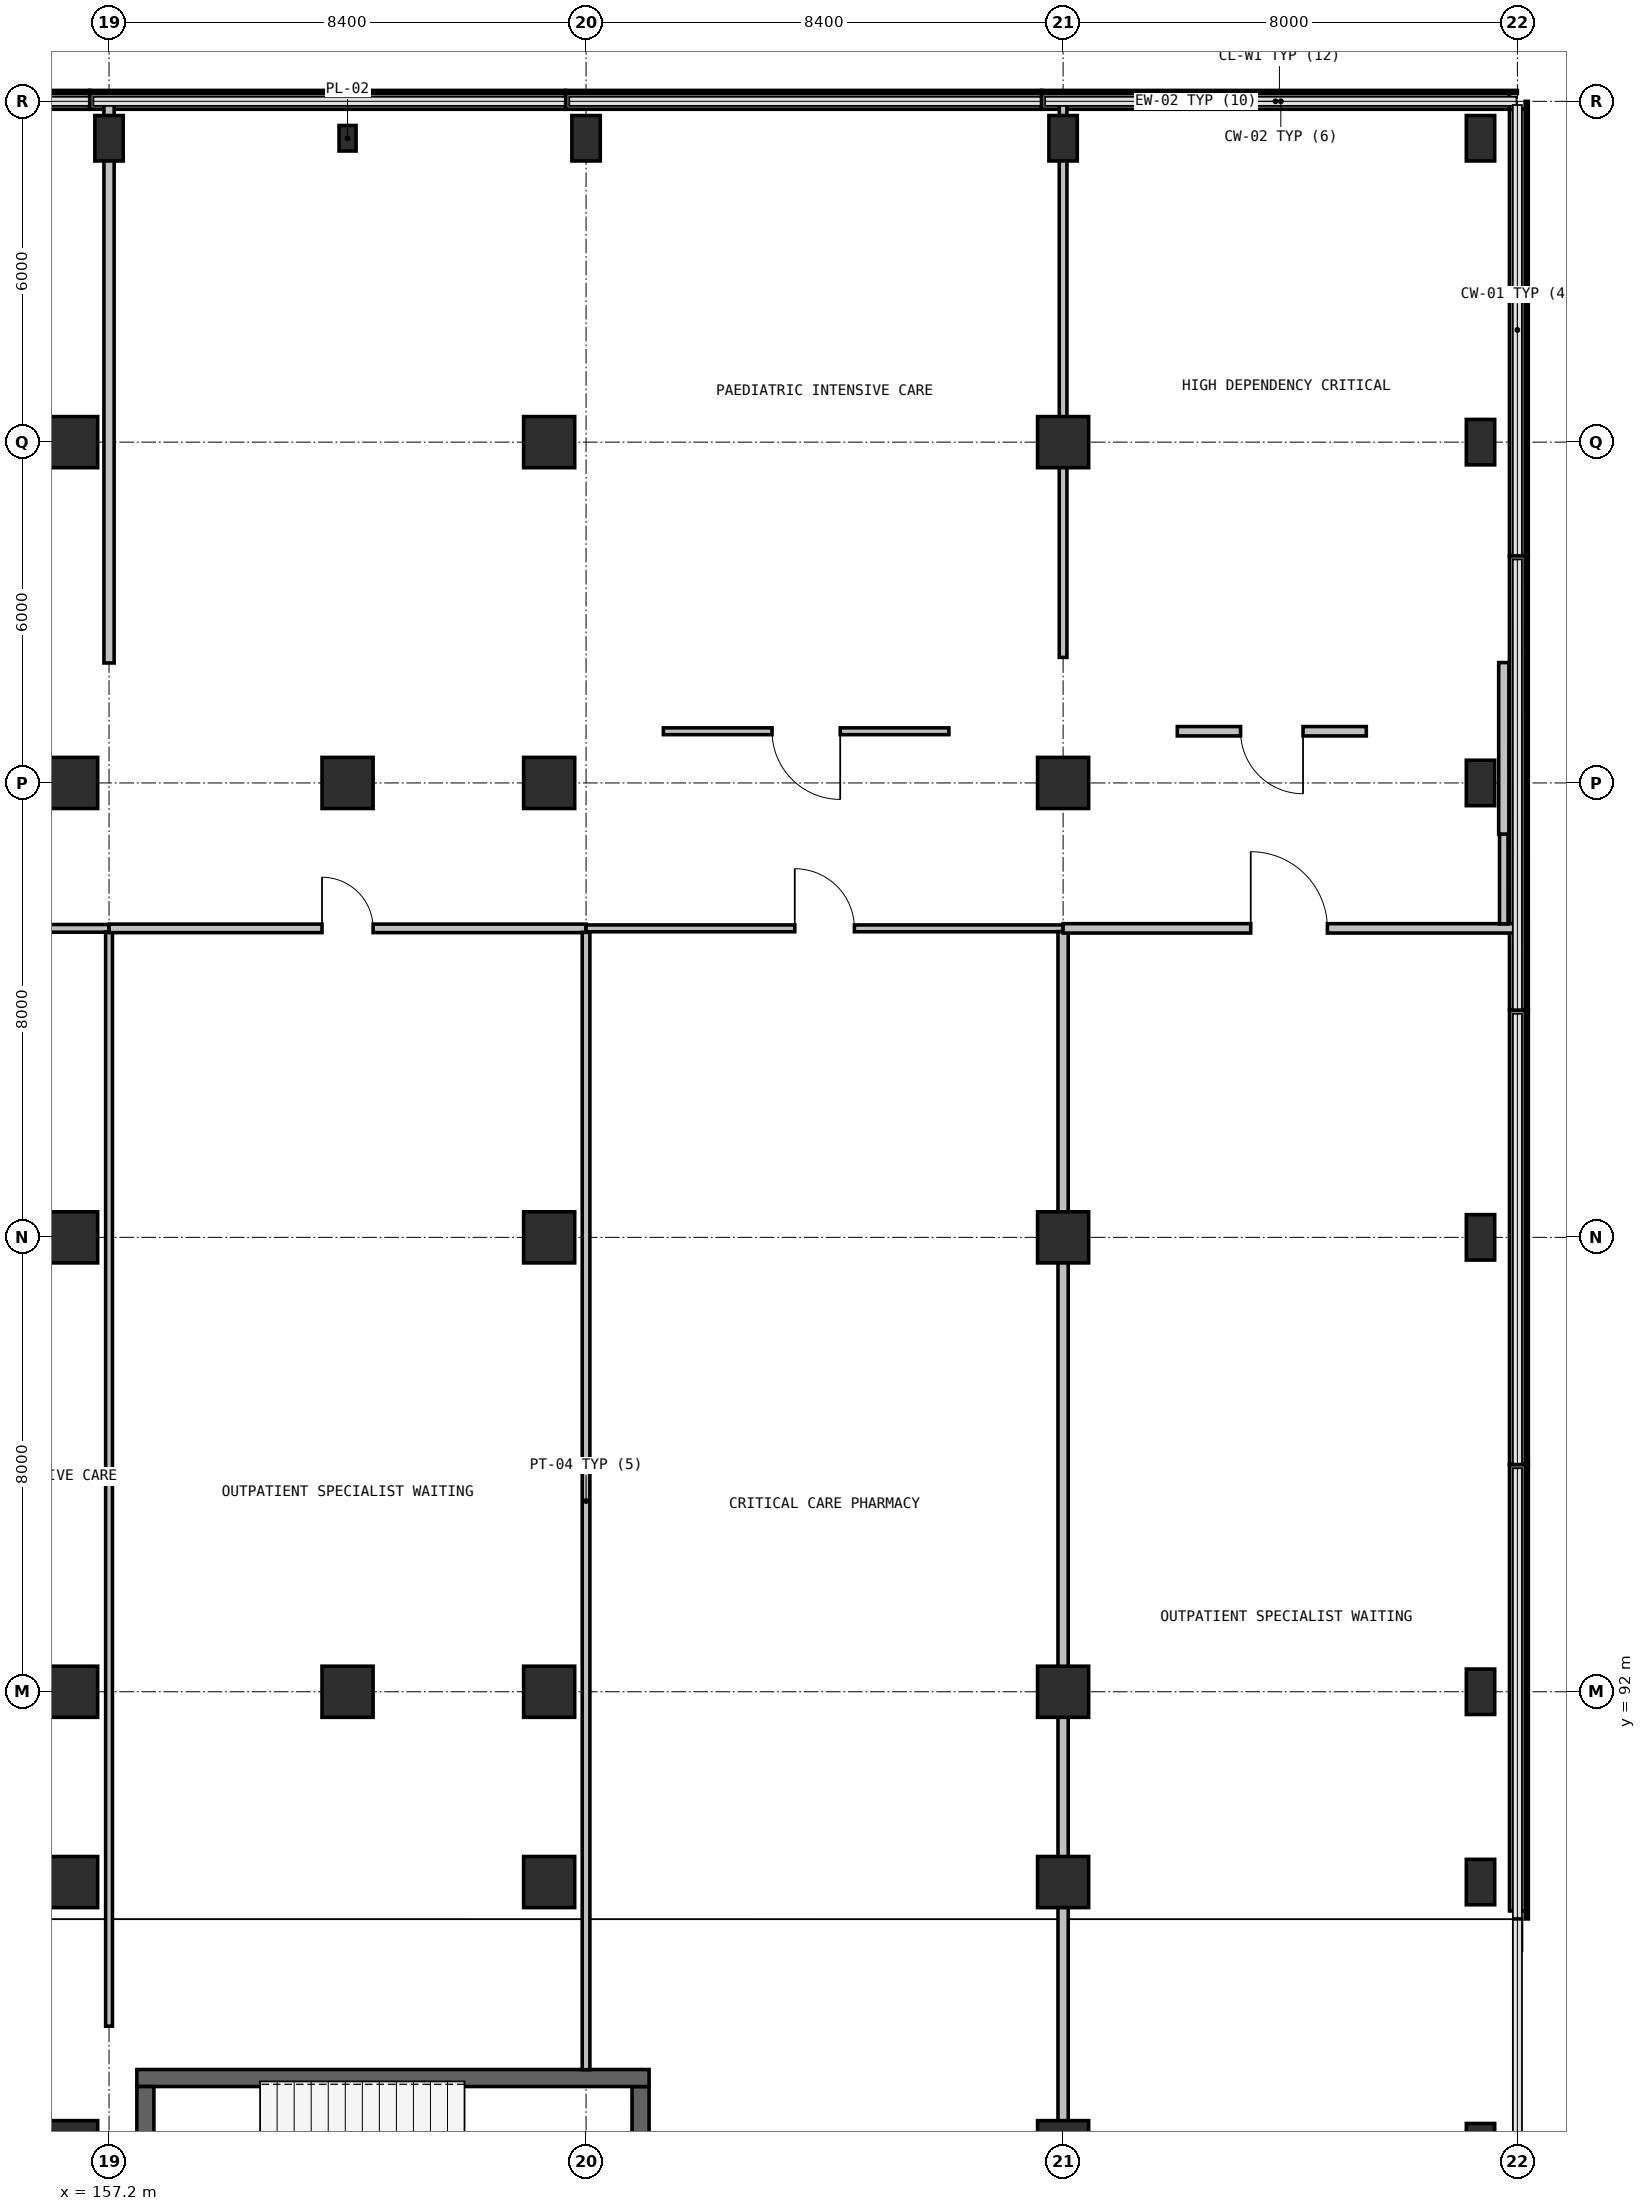
"""IFC4 building model, lengths in metres.
Left out: names, types, materials, properties, quantities, classifications, styles, units other than length and angle.
Written with IfcOpenShell. Run it as: python <this file> out.ifc"""

import sys

from ifc_helpers import new_model, si_unit, direction, frame, frame_2d, origin, origin_2d, place, context, subcontext, project, spatial, rectangle, extrude, element, fill, save


model = new_model("IFC4")
c1 = context("Model", 3, precision=1e-05, world=origin(), true_north=direction((0.0, 1.0)))
c2 = subcontext(c1, "Body", "Model", "MODEL_VIEW")
j1 = project(units=[si_unit("LENGTHUNIT", "METRE"), si_unit("PLANEANGLEUNIT", "RADIAN")], contexts=[c1])
p1 = place(None, origin())
s1 = spatial("IfcSite", under=j1, at=p1, CompositionType="ELEMENT")
p2 = place(p1, origin())
s2 = spatial("IfcBuilding", under=s1, at=p2, CompositionType="ELEMENT")
p3 = place(p2, frame((0.0, 0.0, 5.4)))
s3 = spatial("IfcBuildingStorey", under=s2, at=p3, CompositionType="ELEMENT", Elevation=5.4)
for number, where, z_axis, x_axis in (
    (1, (161.4, 92.0, 0.0), (0.0, 0.0, 1.0), (1.0, 0.0, 0.0)),
    (2, (161.4, 108.0, 0.0), (0.0, 0.0, 1.0), (1.0, 0.0, 0.0)),
):
    element("IfcColumn", number, at=place(p3, frame(where, z_axis=z_axis, x_axis=x_axis)), inside=s3, PredefinedType="COLUMN", context=c2, shape_type="SweptSolid", body=[
        extrude(rectangle(XDim=0.9, YDim=0.9, at=origin_2d()), origin(), (0.0, 0.0, 1.0), 4.8),
    ])
for number, where, z_axis, x_axis in (
    (3, (157.2, 119.35, 0.0), (0.0, 0.0, 1.0), (1.0, 0.0, 0.0)),
    (4, (165.6, 119.35, 0.0), (0.0, 0.0, 1.0), (1.0, 0.0, 0.0)),
    (5, (174.0, 119.35, 0.0), (0.0, 0.0, 1.0), (1.0, 0.0, 0.0)),
    (6, (181.35, 119.35, 0.0), (0.0, 0.0, 1.0), (1.0, 0.0, 0.0)),
):
    element("IfcColumn", number, at=place(p3, frame(where, z_axis=z_axis, x_axis=x_axis)), inside=s3, PredefinedType="COLUMN", context=c2, shape_type="SweptSolid", body=[
        extrude(rectangle(XDim=0.5, YDim=0.8, at=origin_2d()), origin(), (0.0, 0.0, 1.0), 4.8),
    ])
for number, where, z_axis, x_axis in (
    (7, (156.55, 84.0, 0.0), (0.0, 0.0, 1.0), (1.0, 0.0, 0.0)),
    (8, (156.55, 88.65, 0.0), (0.0, 0.0, 1.0), (1.0, 0.0, 0.0)),
    (9, (156.55, 92.0, 0.0), (0.0, 0.0, 1.0), (1.0, 0.0, 0.0)),
    (10, (156.55, 100.0, 0.0), (0.0, 0.0, 1.0), (1.0, 0.0, 0.0)),
    (11, (156.55, 108.0, 0.0), (0.0, 0.0, 1.0), (1.0, 0.0, 0.0)),
    (12, (156.55, 114.0, 0.0), (0.0, 0.0, 1.0), (1.0, 0.0, 0.0)),
    (13, (164.95, 88.65, 0.0), (0.0, 0.0, 1.0), (1.0, 0.0, 0.0)),
    (14, (164.95, 92.0, 0.0), (0.0, 0.0, 1.0), (1.0, 0.0, 0.0)),
    (15, (164.95, 100.0, 0.0), (0.0, 0.0, 1.0), (1.0, 0.0, 0.0)),
    (16, (164.95, 108.0, 0.0), (0.0, 0.0, 1.0), (1.0, 0.0, 0.0)),
    (17, (164.95, 114.0, 0.0), (0.0, 0.0, 1.0), (1.0, 0.0, 0.0)),
    (18, (174.0, 84.0, 0.0), (0.0, 0.0, 1.0), (1.0, 0.0, 0.0)),
    (19, (174.0, 88.65, 0.0), (0.0, 0.0, 1.0), (1.0, 0.0, 0.0)),
    (20, (174.0, 92.0, 0.0), (0.0, 0.0, 1.0), (1.0, 0.0, 0.0)),
    (21, (174.0, 100.0, 0.0), (0.0, 0.0, 1.0), (1.0, 0.0, 0.0)),
    (22, (174.0, 108.0, 0.0), (0.0, 0.0, 1.0), (1.0, 0.0, 0.0)),
    (23, (174.0, 114.0, 0.0), (0.0, 0.0, 1.0), (1.0, 0.0, 0.0)),
):
    element("IfcColumn", number, at=place(p3, frame(where, z_axis=z_axis, x_axis=x_axis)), inside=s3, PredefinedType="COLUMN", context=c2, shape_type="SweptSolid", body=[
        extrude(rectangle(XDim=0.9, YDim=0.9, at=origin_2d()), origin(), (0.0, 0.0, 1.0), 4.8),
    ])
for number, where, z_axis, x_axis in (
    (24, (181.35, 84.0, 0.0), (0.0, 0.0, 1.0), (1.0, 0.0, 0.0)),
    (25, (181.35, 88.65, 0.0), (0.0, 0.0, 1.0), (1.0, 0.0, 0.0)),
    (26, (181.35, 92.0, 0.0), (0.0, 0.0, 1.0), (1.0, 0.0, 0.0)),
    (27, (181.35, 100.0, 0.0), (0.0, 0.0, 1.0), (1.0, 0.0, 0.0)),
    (28, (181.35, 108.0, 0.0), (0.0, 0.0, 1.0), (1.0, 0.0, 0.0)),
    (29, (181.35, 114.0, 0.0), (0.0, 0.0, 1.0), (1.0, 0.0, 0.0)),
):
    element("IfcColumn", number, at=place(p3, frame(where, z_axis=z_axis, x_axis=x_axis)), inside=s3, PredefinedType="COLUMN", context=c2, shape_type="SweptSolid", body=[
        extrude(rectangle(XDim=0.5, YDim=0.8, at=origin_2d()), origin(), (0.0, 0.0, 1.0), 4.8),
    ])
p4 = place(p3, frame((161.4, 119.35, 0.0), z_axis=(0.0, 0.0, 1.0), x_axis=(1.0, 0.0, 0.0)))
e30 = element("IfcColumn", 30, at=p4, inside=s3, PredefinedType="PILASTER", context=c2, shape_type="SweptSolid", body=[
    extrude(rectangle(XDim=0.3, YDim=0.45, at=origin_2d()), origin(), (0.0, 0.0, 1.0), 4.445),
])
for number, where, z_axis, x_axis in (
    (31, (148.481, 120.0, 0.0), (0.0, 0.0, 1.0), (1.0, 0.0, 0.0)),
    (32, (156.861, 120.0, 0.0), (0.0, 0.0, 1.0), (1.0, 0.0, 0.0)),
    (33, (165.241, 120.0, 0.0), (0.0, 0.0, 1.0), (1.0, 0.0, 0.0)),
):
    element("IfcWall", number, at=place(p3, frame(where, z_axis=z_axis, x_axis=x_axis)), inside=s3, PredefinedType="SOLIDWALL", context=c2, shape_type="SweptSolid", body=[
        extrude(rectangle(XDim=8.376, YDim=0.28, at=frame_2d((4.188, 0.0))), origin(), (0.0, 0.0, 1.0), 0.94),
    ])
p5 = place(p3, frame((173.621, 120.0, 0.0), z_axis=(0.0, 0.0, 1.0), x_axis=(1.0, 0.0, 0.0)))
e34 = element("IfcWall", 34, at=p5, inside=s3, PredefinedType="SOLIDWALL", context=c2, shape_type="SweptSolid", body=[
    extrude(rectangle(XDim=8.238, YDim=0.28, at=frame_2d((4.119, 0.0))), origin(), (0.0, 0.0, 1.0), 0.94),
])
p6 = place(p3, frame((181.999, 119.86, 0.0), z_axis=(0.0, 0.0, 1.0), x_axis=(0.0, -1.0, 0.0)))
e35 = element("IfcWall", 35, at=p6, inside=s3, PredefinedType="SOLIDWALL", context=c2, shape_type="SweptSolid", body=[
    extrude(rectangle(XDim=7.858, YDim=0.28, at=frame_2d((3.929, 0.0))), origin(), (0.0, 0.0, 1.0), 0.94),
])
p7 = place(p3, frame((181.999, 111.998, 0.0), z_axis=(0.0, 0.0, 1.0), x_axis=(0.000122144863, -0.99999999254, 0.0)))
e36 = element("IfcWall", 36, at=p7, inside=s3, PredefinedType="SOLIDWALL", context=c2, shape_type="SweptSolid", body=[
    extrude(rectangle(XDim=7.995, YDim=0.28, at=frame_2d((3.998, 0.0))), origin(), (0.0, 0.0, 1.0), 0.94),
])
p8 = place(p3, frame((182.0, 103.999, 0.0), z_axis=(0.0, 0.0, 1.0), x_axis=(0.0, -1.0, 0.0)))
e37 = element("IfcWall", 37, at=p8, inside=s3, PredefinedType="SOLIDWALL", context=c2, shape_type="SweptSolid", body=[
    extrude(rectangle(XDim=7.996, YDim=0.28, at=frame_2d((3.998, 0.0))), origin(), (0.0, 0.0, 1.0), 0.94),
])
p9 = place(p3, frame((182.0, 95.999, 0.0), z_axis=(0.0, 0.0, 1.0), x_axis=(0.0, -1.0, 0.0)))
e38 = element("IfcWall", 38, at=p9, inside=s3, PredefinedType="SOLIDWALL", context=c2, shape_type="SweptSolid", body=[
    extrude(rectangle(XDim=7.858, YDim=0.28, at=frame_2d((3.929, 0.0))), origin(), (0.0, 0.0, 1.0), 0.94),
])
p10 = place(p3, frame((166.56, 81.19, 0.0), z_axis=(0.0, 0.0, 1.0), x_axis=(0.0, 1.0, 0.0)))
e39 = element("IfcWall", 39, at=p10, inside=s3, PredefinedType="SHEAR", context=c2, shape_type="SweptSolid", body=[
    extrude(rectangle(XDim=3.86, YDim=0.3, at=frame_2d((1.93, 0.0))), origin(), (0.0, 0.0, 1.0), 4.445),
])
p11 = place(p3, frame((166.71, 85.2, 0.0), z_axis=(0.0, 0.0, 1.0), x_axis=(-1.0, 0.0, 0.0)))
e40 = element("IfcWall", 40, at=p11, inside=s3, PredefinedType="SHEAR", context=c2, shape_type="SweptSolid", body=[
    extrude(rectangle(XDim=9.02, YDim=0.3, at=frame_2d((4.51, 0.0))), origin(), (0.0, 0.0, 1.0), 4.445),
])
p12 = place(p3, frame((157.84, 85.05, 0.0), z_axis=(0.0, 0.0, 1.0), x_axis=(0.0, -1.0, 0.0)))
e41 = element("IfcWall", 41, at=p12, inside=s3, PredefinedType="SHEAR", context=c2, shape_type="SweptSolid", body=[
    extrude(rectangle(XDim=3.86, YDim=0.3, at=frame_2d((1.93, 0.0))), origin(), (0.0, 0.0, 1.0), 4.445),
])
p13 = place(p12, frame((1.38, 0.0, 0.0)))
e42 = element("IfcOpeningElement", 42, at=p13, cuts=e41, PredefinedType="OPENING", context=c2, shape_type="SweptSolid", body=[
    extrude(rectangle(XDim=1.1, YDim=2.15, at=frame_2d((0.55, 1.075))), frame((0.0, 0.16, 0.0), z_axis=(0.0, -1.0, 0.0), x_axis=(1.0, 0.0, 0.0)), (0.0, 0.0, 1.0), 0.32),
])
p14 = place(p3, frame((153.731, 105.44, 0.0), z_axis=(0.0, 0.0, 1.0), x_axis=(1.0, 0.0, 0.0)))
e43 = element("IfcWall", 43, at=p14, inside=s3, PredefinedType="PARTITIONING", context=c2, shape_type="SweptSolid", body=[
    extrude(rectangle(XDim=3.469, YDim=0.135, at=frame_2d((1.734, 0.0))), origin(), (0.0, 0.0, 1.0), 4.445),
])
p15 = place(p14, frame((1.234, 0.0, 0.0)))
e44 = element("IfcOpeningElement", 44, at=p15, cuts=e43, PredefinedType="OPENING", context=c2, shape_type="SweptSolid", body=[
    extrude(rectangle(XDim=1.0, YDim=2.15, at=frame_2d((0.5, 1.075))), frame((0.0, 0.077, 0.0), z_axis=(0.0, -1.0, 0.0), x_axis=(1.0, 0.0, 0.0)), (0.0, 0.0, 1.0), 0.155),
])
p16 = place(p3, frame((157.2, 105.376, 0.0), z_axis=(0.0, 0.0, 1.0), x_axis=(0.0, -1.0, 0.0)))
e45 = element("IfcWall", 45, at=p16, inside=s3, PredefinedType="PARTITIONING", context=c2, shape_type="SweptSolid", body=[
    extrude(rectangle(XDim=19.264, YDim=0.12, at=frame_2d((9.632, 0.0))), origin(), (0.0, 0.0, 1.0), 4.445),
])
p17 = place(p3, frame((157.2, 105.44, 0.0), z_axis=(0.0, 0.0, 1.0), x_axis=(1.0, 0.0, 0.0)))
e46 = element("IfcWall", 46, at=p17, inside=s3, PredefinedType="PARTITIONING", context=c2, shape_type="SweptSolid", body=[
    extrude(rectangle(XDim=8.4, YDim=0.15, at=frame_2d((4.2, 0.0))), origin(), (0.0, 0.0, 1.0), 4.445),
])
p18 = place(p17, frame((3.75, 0.0, 0.0)))
e47 = element("IfcOpeningElement", 47, at=p18, cuts=e46, PredefinedType="OPENING", context=c2, shape_type="SweptSolid", body=[
    extrude(rectangle(XDim=0.9, YDim=2.1, at=frame_2d((0.45, 1.05))), frame((0.0, 0.085, 0.0), z_axis=(0.0, -1.0, 0.0), x_axis=(1.0, 0.0, 0.0)), (0.0, 0.0, 1.0), 0.17),
])
p19 = place(p3, frame((165.6, 105.369, 0.0), z_axis=(0.0, 0.0, 1.0), x_axis=(0.0, -1.0, 0.0)))
e48 = element("IfcWall", 48, at=p19, inside=s3, PredefinedType="PARTITIONING", context=c2, shape_type="SweptSolid", body=[
    extrude(rectangle(XDim=20.022, YDim=0.135, at=frame_2d((10.011, 0.0))), origin(), (0.0, 0.0, 1.0), 4.445),
])
p20 = place(p3, frame((165.6, 105.44, 0.0), z_axis=(0.0, 0.0, 1.0), x_axis=(1.0, 0.0, 0.0)))
e49 = element("IfcWall", 49, at=p20, inside=s3, PredefinedType="PARTITIONING", context=c2, shape_type="SweptSolid", body=[
    extrude(rectangle(XDim=8.4, YDim=0.12, at=frame_2d((4.2, 0.0))), origin(), (0.0, 0.0, 1.0), 4.445),
])
p21 = place(p20, frame((3.675, 0.0, 0.0)))
e50 = element("IfcOpeningElement", 50, at=p21, cuts=e49, PredefinedType="OPENING", context=c2, shape_type="SweptSolid", body=[
    extrude(rectangle(XDim=1.05, YDim=2.15, at=frame_2d((0.525, 1.075))), frame((0.0, 0.07, 0.0), z_axis=(0.0, -1.0, 0.0), x_axis=(1.0, 0.0, 0.0)), (0.0, 0.0, 1.0), 0.14),
])
p22 = place(p3, frame((174.0, 105.384, 0.0), z_axis=(0.0, 0.0, 1.0), x_axis=(0.0, -1.0, 0.0)))
e51 = element("IfcWall", 51, at=p22, inside=s3, PredefinedType="PARTITIONING", context=c2, shape_type="SweptSolid", body=[
    extrude(rectangle(XDim=27.706, YDim=0.18, at=frame_2d((13.853, 0.0))), origin(), (0.0, 0.0, 1.0), 3.695),
])
p23 = place(p3, frame((174.0, 105.44, 0.0), z_axis=(0.0, 0.0, 1.0), x_axis=(1.0, 0.0, 0.0)))
e52 = element("IfcWall", 52, at=p23, inside=s3, PredefinedType="PARTITIONING", context=c2, shape_type="SweptSolid", body=[
    extrude(rectangle(XDim=7.958, YDim=0.165, at=frame_2d((3.979, 0.0))), origin(), (0.0, 0.0, 1.0), 4.445),
])
p24 = place(p23, frame((3.304, 0.0, 0.0)))
e53 = element("IfcOpeningElement", 53, at=p24, cuts=e52, PredefinedType="OPENING", context=c2, shape_type="SweptSolid", body=[
    extrude(rectangle(XDim=1.35, YDim=2.15, at=frame_2d((0.675, 1.075))), frame((0.0, 0.093, 0.0), z_axis=(0.0, -1.0, 0.0), x_axis=(1.0, 0.0, 0.0)), (0.0, 0.0, 1.0), 0.185),
])
p25 = place(p3, frame((181.76, 105.519, 0.0), z_axis=(0.0, 0.0, 1.0), x_axis=(0.0, 1.0, 0.0)))
e54 = element("IfcWall", 54, at=p25, inside=s3, PredefinedType="PARTITIONING", context=c2, shape_type="SweptSolid", body=[
    extrude(rectangle(XDim=1.581, YDim=0.15, at=frame_2d((0.791, 0.0))), origin(), (0.0, 0.0, 1.0), 4.445),
])
p26 = place(p3, frame((157.2, 119.958, 0.0), z_axis=(0.0, 0.0, 1.0), x_axis=(0.0, -1.0, 0.0)))
e55 = element("IfcWall", 55, at=p26, inside=s3, PredefinedType="PARTITIONING", context=c2, shape_type="SweptSolid", body=[
    extrude(rectangle(XDim=9.846, YDim=0.18, at=frame_2d((4.923, 0.0))), origin(), (0.0, 0.0, 1.0), 4.445),
])
p27 = place(p3, frame((174.0, 119.958, 0.0), z_axis=(0.0, 0.0, 1.0), x_axis=(0.0, -1.0, 0.0)))
e56 = element("IfcWall", 56, at=p27, inside=s3, PredefinedType="PARTITIONING", context=c2, shape_type="SweptSolid", body=[
    extrude(rectangle(XDim=9.748, YDim=0.135, at=frame_2d((4.874, 0.0))), origin(), (0.0, 0.0, 1.0), 3.695),
])
p28 = place(p3, frame((171.989, 108.91, 0.0), z_axis=(0.0, 0.0, 1.0), x_axis=(-1.0, 0.0, 0.0)))
e57 = element("IfcWall", 57, at=p28, inside=s3, PredefinedType="PARTITIONING", context=c2, shape_type="SweptSolid", body=[
    extrude(rectangle(XDim=5.028, YDim=0.12, at=frame_2d((2.514, 0.0))), origin(), (0.0, 0.0, 1.0), 4.445),
])
p29 = place(p28, frame((1.914, 0.0, 0.0)))
e58 = element("IfcOpeningElement", 58, at=p29, cuts=e57, PredefinedType="OPENING", context=c2, shape_type="SweptSolid", body=[
    extrude(rectangle(XDim=1.2, YDim=2.15, at=frame_2d((0.6, 1.075))), frame((0.0, 0.07, 0.0), z_axis=(0.0, -1.0, 0.0), x_axis=(1.0, 0.0, 0.0)), (0.0, 0.0, 1.0), 0.14),
])
p30 = place(p3, frame((181.76, 107.1, 0.0), z_axis=(0.0, 0.0, 1.0), x_axis=(0.0, 1.0, 0.0)))
e59 = element("IfcWall", 59, at=p30, inside=s3, PredefinedType="PARTITIONING", context=c2, shape_type="SweptSolid", body=[
    extrude(rectangle(XDim=3.019, YDim=0.18, at=frame_2d((1.509, 0.0))), origin(), (0.0, 0.0, 1.0), 4.445),
])
p31 = place(p3, frame((179.339, 108.91, 0.0), z_axis=(0.0, 0.0, 1.0), x_axis=(-1.0, 0.0, 0.0)))
e60 = element("IfcWall", 60, at=p31, inside=s3, PredefinedType="PARTITIONING", context=c2, shape_type="SweptSolid", body=[
    extrude(rectangle(XDim=3.328, YDim=0.165, at=frame_2d((1.664, 0.0))), origin(), (0.0, 0.0, 1.0), 4.445),
])
p32 = place(p31, frame((1.114, 0.0, 0.0)))
e61 = element("IfcOpeningElement", 61, at=p32, cuts=e60, PredefinedType="OPENING", context=c2, shape_type="SweptSolid", body=[
    extrude(rectangle(XDim=1.1, YDim=2.15, at=frame_2d((0.55, 1.075))), frame((0.0, 0.093, 0.0), z_axis=(0.0, -1.0, 0.0), x_axis=(1.0, 0.0, 0.0)), (0.0, 0.0, 1.0), 0.185),
])
p33 = place(p18, origin())
e62 = element("IfcDoor", 62, at=p33, inside=s3, OperationType="SINGLE_SWING_LEFT", PredefinedType="DOOR", context=c2, shape_type="SweptSolid", body=[
    extrude(rectangle(XDim=0.9, YDim=2.1, at=frame_2d((0.45, 1.05))), frame((0.0, 0.025, 0.0), z_axis=(0.0, -1.0, 0.0), x_axis=(1.0, 0.0, 0.0)), (0.0, 0.0, 1.0), 0.05),
])
fill(e47, e62)
p34 = place(p21, origin())
e63 = element("IfcDoor", 63, at=p34, inside=s3, OperationType="SINGLE_SWING_RIGHT", PredefinedType="DOOR", context=c2, shape_type="SweptSolid", body=[
    extrude(rectangle(XDim=1.05, YDim=2.15, at=frame_2d((0.525, 1.075))), frame((0.0, 0.025, 0.0), z_axis=(0.0, -1.0, 0.0), x_axis=(1.0, 0.0, 0.0)), (0.0, 0.0, 1.0), 0.05),
])
fill(e50, e63)
p35 = place(p24, origin())
e64 = element("IfcDoor", 64, at=p35, inside=s3, OperationType="SINGLE_SWING_LEFT", PredefinedType="DOOR", context=c2, shape_type="SweptSolid", body=[
    extrude(rectangle(XDim=1.35, YDim=2.15, at=frame_2d((0.675, 1.075))), frame((0.0, 0.025, 0.0), z_axis=(0.0, -1.0, 0.0), x_axis=(1.0, 0.0, 0.0)), (0.0, 0.0, 1.0), 0.05),
])
fill(e53, e64)
p36 = place(p29, origin())
e65 = element("IfcDoor", 65, at=p36, inside=s3, OperationType="SINGLE_SWING_RIGHT", PredefinedType="DOOR", context=c2, shape_type="SweptSolid", body=[
    extrude(rectangle(XDim=1.2, YDim=2.15, at=frame_2d((0.6, 1.075))), frame((0.0, 0.025, 0.0), z_axis=(0.0, -1.0, 0.0), x_axis=(1.0, 0.0, 0.0)), (0.0, 0.0, 1.0), 0.05),
])
fill(e58, e65)
p37 = place(p32, origin())
e66 = element("IfcDoor", 66, at=p37, inside=s3, OperationType="SINGLE_SWING_LEFT", PredefinedType="DOOR", context=c2, shape_type="SweptSolid", body=[
    extrude(rectangle(XDim=1.1, YDim=2.15, at=frame_2d((0.55, 1.075))), frame((0.0, 0.025, 0.0), z_axis=(0.0, -1.0, 0.0), x_axis=(1.0, 0.0, 0.0)), (0.0, 0.0, 1.0), 0.05),
])
fill(e61, e66)
save(model, sys.argv[1])
